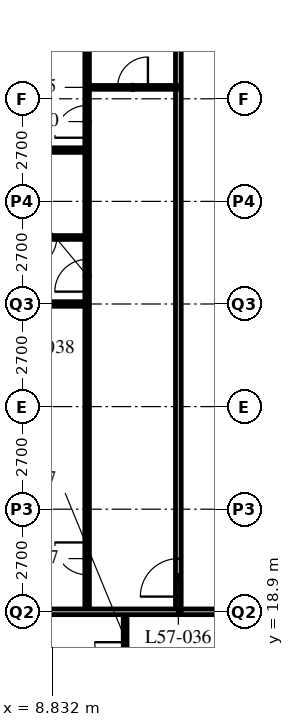
"""IFC4 building model, lengths in metres.
Left out: names, types, materials, properties, quantities, classifications, styles, units other than length and angle.
Written with IfcOpenShell. Run it as: python <this file> out.ifc"""

import sys

from ifc_helpers import new_model, si_unit, direction, frame, frame_2d, origin, place, context, subcontext, project, spatial, rectangle, extrude, element, fill, save


model = new_model("IFC4")
c1 = context("Model", 3, precision=1e-05, world=origin(), true_north=direction((0.0, 1.0)))
c2 = subcontext(c1, "Body", "Model", "MODEL_VIEW")
j1 = project(units=[si_unit("LENGTHUNIT", "METRE"), si_unit("PLANEANGLEUNIT", "RADIAN")], contexts=[c1])
p1 = place(None, origin())
s1 = spatial("IfcSite", under=j1, at=p1, CompositionType="ELEMENT")
p2 = place(p1, origin())
s2 = spatial("IfcBuilding", under=s1, at=p2, CompositionType="ELEMENT")
p3 = place(p2, frame((0.0, 0.0, 220.8)))
s3 = spatial("IfcBuildingStorey", under=s2, at=p3, CompositionType="ELEMENT", Elevation=220.8)
p4 = place(p3, frame((12.15, 18.9, 0.0), z_axis=(0.0, 0.0, 1.0), x_axis=(1.0, 0.0, 0.0)))
e1 = element("IfcWall", 1, at=p4, inside=s3, PredefinedType="PARTITIONING", context=c2, shape_type="SweptSolid", body=[
    extrude(rectangle(XDim=36.45, YDim=0.15, at=frame_2d((18.225, 0.0))), origin(), (0.0, 0.0, 1.0), 2.628),
])
p5 = place(p4, frame((4.95, 0.0, 0.0)))
e2 = element("IfcOpeningElement", 2, at=p5, cuts=e1, PredefinedType="OPENING", context=c2, shape_type="SweptSolid", body=[
    extrude(rectangle(XDim=1.0, YDim=2.1, at=frame_2d((0.5, 1.05))), frame((0.0, 0.085, 0.0), z_axis=(0.0, -1.0, 0.0), x_axis=(1.0, 0.0, 0.0)), (0.0, 0.0, 1.0), 0.17),
])
p6 = place(p4, frame((22.6, 0.0, 0.0)))
e3 = element("IfcOpeningElement", 3, at=p6, cuts=e1, PredefinedType="OPENING", context=c2, shape_type="SweptSolid", body=[
    extrude(rectangle(XDim=1.0, YDim=2.1, at=frame_2d((0.5, 1.05))), frame((0.0, 0.085, 0.0), z_axis=(0.0, -1.0, 0.0), x_axis=(1.0, 0.0, 0.0)), (0.0, 0.0, 1.0), 0.17),
])
p7 = place(p4, frame((25.0, 0.0, 0.0)))
e4 = element("IfcOpeningElement", 4, at=p7, cuts=e1, PredefinedType="OPENING", context=c2, shape_type="SweptSolid", body=[
    extrude(rectangle(XDim=1.0, YDim=2.1, at=frame_2d((0.5, 1.05))), frame((0.0, 0.085, 0.0), z_axis=(0.0, -1.0, 0.0), x_axis=(1.0, 0.0, 0.0)), (0.0, 0.0, 1.0), 0.17),
])
p8 = place(p4, frame((30.7, 0.0, 0.0)))
e5 = element("IfcOpeningElement", 5, at=p8, cuts=e1, PredefinedType="OPENING", context=c2, shape_type="SweptSolid", body=[
    extrude(rectangle(XDim=1.0, YDim=2.1, at=frame_2d((0.5, 1.05))), frame((0.0, 0.085, 0.0), z_axis=(0.0, -1.0, 0.0), x_axis=(1.0, 0.0, 0.0)), (0.0, 0.0, 1.0), 0.17),
])
p9 = place(p4, frame((1.525, 0.0, 0.0)))
e6 = element("IfcOpeningElement", 6, at=p9, cuts=e1, PredefinedType="OPENING", context=c2, shape_type="SweptSolid", body=[
    extrude(rectangle(XDim=1.0, YDim=2.1, at=frame_2d((0.5, 1.05))), frame((0.0, 0.085, 0.0), z_axis=(0.0, -1.0, 0.0), x_axis=(1.0, 0.0, 0.0)), (0.0, 0.0, 1.0), 0.17),
])
p10 = place(p4, frame((32.825, 0.0, 0.0)))
e7 = element("IfcOpeningElement", 7, at=p10, cuts=e1, PredefinedType="OPENING", context=c2, shape_type="SweptSolid", body=[
    extrude(rectangle(XDim=1.0, YDim=2.1, at=frame_2d((0.5, 1.05))), frame((0.0, 0.085, 0.0), z_axis=(0.0, -1.0, 0.0), x_axis=(1.0, 0.0, 0.0)), (0.0, 0.0, 1.0), 0.17),
])
p11 = place(p3, frame((12.15, 18.9, 0.0), z_axis=(0.0, 0.0, 1.0), x_axis=(0.0, 1.0, 0.0)))
e8 = element("IfcWall", 8, at=p11, inside=s3, PredefinedType="PARTITIONING", context=c2, shape_type="SweptSolid", body=[
    extrude(rectangle(XDim=24.3, YDim=0.15, at=frame_2d((12.15, 0.0))), origin(), (0.0, 0.0, 1.0), 3.39),
])
p12 = place(p11, frame((0.4, 0.0, 0.0)))
e9 = element("IfcOpeningElement", 9, at=p12, cuts=e8, PredefinedType="OPENING", context=c2, shape_type="SweptSolid", body=[
    extrude(rectangle(XDim=1.0, YDim=2.1, at=frame_2d((0.5, 1.05))), frame((0.0, 0.085, 0.0), z_axis=(0.0, -1.0, 0.0), x_axis=(1.0, 0.0, 0.0)), (0.0, 0.0, 1.0), 0.17),
])
p13 = place(p11, frame((16.6, 0.0, 0.0)))
e10 = element("IfcOpeningElement", 10, at=p13, cuts=e8, PredefinedType="OPENING", context=c2, shape_type="SweptSolid", body=[
    extrude(rectangle(XDim=1.0, YDim=2.1, at=frame_2d((0.5, 1.05))), frame((0.0, 0.085, 0.0), z_axis=(0.0, -1.0, 0.0), x_axis=(1.0, 0.0, 0.0)), (0.0, 0.0, 1.0), 0.17),
])
p14 = place(p3, frame((9.75, 18.9, 0.0), z_axis=(0.0, 0.0, 1.0), x_axis=(0.0, 1.0, 0.0)))
e11 = element("IfcWall", 11, at=p14, inside=s3, PredefinedType="PARTITIONING", context=c2, shape_type="SweptSolid", body=[
    extrude(rectangle(XDim=24.3, YDim=0.12, at=frame_2d((12.15, 0.0))), origin(), (0.0, 0.0, 1.0), 3.39),
])
p15 = place(p14, frame((0.975, 0.0, 0.0)))
e12 = element("IfcOpeningElement", 12, at=p15, cuts=e11, PredefinedType="OPENING", context=c2, shape_type="SweptSolid", body=[
    extrude(rectangle(XDim=0.85, YDim=2.1, at=frame_2d((0.425, 1.05))), frame((0.0, 0.07, 0.0), z_axis=(0.0, -1.0, 0.0), x_axis=(1.0, 0.0, 0.0)), (0.0, 0.0, 1.0), 0.14),
])
p16 = place(p14, frame((8.425, 0.0, 0.0)))
e13 = element("IfcOpeningElement", 13, at=p16, cuts=e11, PredefinedType="OPENING", context=c2, shape_type="SweptSolid", body=[
    extrude(rectangle(XDim=0.85, YDim=2.1, at=frame_2d((0.425, 1.05))), frame((0.0, 0.07, 0.0), z_axis=(0.0, -1.0, 0.0), x_axis=(1.0, 0.0, 0.0)), (0.0, 0.0, 1.0), 0.14),
])
p17 = place(p14, frame((12.475, 0.0, 0.0)))
e14 = element("IfcOpeningElement", 14, at=p17, cuts=e11, PredefinedType="OPENING", context=c2, shape_type="SweptSolid", body=[
    extrude(rectangle(XDim=0.85, YDim=2.1, at=frame_2d((0.425, 1.05))), frame((0.0, 0.07, 0.0), z_axis=(0.0, -1.0, 0.0), x_axis=(1.0, 0.0, 0.0)), (0.0, 0.0, 1.0), 0.14),
])
p18 = place(p14, frame((17.175, 0.0, 0.0)))
e15 = element("IfcOpeningElement", 15, at=p18, cuts=e11, PredefinedType="OPENING", context=c2, shape_type="SweptSolid", body=[
    extrude(rectangle(XDim=0.85, YDim=2.1, at=frame_2d((0.425, 1.05))), frame((0.0, 0.07, 0.0), z_axis=(0.0, -1.0, 0.0), x_axis=(1.0, 0.0, 0.0)), (0.0, 0.0, 1.0), 0.14),
])
p19 = place(p14, frame((20.575, 0.0, 0.0)))
e16 = element("IfcOpeningElement", 16, at=p19, cuts=e11, PredefinedType="OPENING", context=c2, shape_type="SweptSolid", body=[
    extrude(rectangle(XDim=0.85, YDim=2.1, at=frame_2d((0.425, 1.05))), frame((0.0, 0.07, 0.0), z_axis=(0.0, -1.0, 0.0), x_axis=(1.0, 0.0, 0.0)), (0.0, 0.0, 1.0), 0.14),
])
p20 = place(p3, frame((12.15, 32.7, 0.0), z_axis=(0.0, 0.0, 1.0), x_axis=(-1.0, 0.0, 0.0)))
e17 = element("IfcWall", 17, at=p20, inside=s3, PredefinedType="PARTITIONING", context=c2, shape_type="SweptSolid", body=[
    extrude(rectangle(XDim=2.4, YDim=0.1, at=frame_2d((1.2, 0.0))), origin(), (0.0, 0.0, 1.0), 3.39),
])
p21 = place(p20, frame((0.8, 0.0, 0.0)))
e18 = element("IfcOpeningElement", 18, at=p21, cuts=e17, PredefinedType="OPENING", context=c2, shape_type="SweptSolid", body=[
    extrude(rectangle(XDim=0.8, YDim=2.1, at=frame_2d((0.4, 1.05))), frame((0.0, 0.06, 0.0), z_axis=(0.0, -1.0, 0.0), x_axis=(1.0, 0.0, 0.0)), (0.0, 0.0, 1.0), 0.12),
])
p22 = place(p3, frame((9.75, 28.75, 0.0), z_axis=(0.0, 0.0, 1.0), x_axis=(-1.0, 0.0, 0.0)))
e19 = element("IfcWall", 19, at=p22, inside=s3, PredefinedType="PARTITIONING", context=c2, shape_type="SweptSolid", body=[
    extrude(rectangle(XDim=2.4, YDim=0.1, at=frame_2d((1.2, 0.0))), origin(), (0.0, 0.0, 1.0), 3.39),
])
p23 = place(p22, frame((0.8, 0.0, 0.0)))
e20 = element("IfcOpeningElement", 20, at=p23, cuts=e19, PredefinedType="OPENING", context=c2, shape_type="SweptSolid", body=[
    extrude(rectangle(XDim=0.8, YDim=2.1, at=frame_2d((0.4, 1.05))), frame((0.0, 0.06, 0.0), z_axis=(0.0, -1.0, 0.0), x_axis=(1.0, 0.0, 0.0)), (0.0, 0.0, 1.0), 0.12),
])
p24 = place(p3, frame((9.75, 27.0, 0.0), z_axis=(0.0, 0.0, 1.0), x_axis=(-1.0, 0.0, 0.0)))
e21 = element("IfcWall", 21, at=p24, inside=s3, PredefinedType="PARTITIONING", context=c2, shape_type="SweptSolid", body=[
    extrude(rectangle(XDim=9.45, YDim=0.12, at=frame_2d((4.725, 0.0))), origin(), (0.0, 0.0, 1.0), 2.628),
])
p25 = place(p3, frame((9.75, 31.05, 0.0), z_axis=(0.0, 0.0, 1.0), x_axis=(-1.0, 0.0, 0.0)))
e22 = element("IfcWall", 22, at=p25, inside=s3, PredefinedType="PARTITIONING", context=c2, shape_type="SweptSolid", body=[
    extrude(rectangle(XDim=9.45, YDim=0.12, at=frame_2d((4.725, 0.0))), origin(), (0.0, 0.0, 1.0), 3.39),
])
p26 = place(p3, frame((10.75, 18.9, 0.0), z_axis=(0.0, 0.0, 1.0), x_axis=(0.0, -1.0, 0.0)))
e23 = element("IfcWall", 23, at=p26, inside=s3, PredefinedType="PARTITIONING", context=c2, shape_type="SweptSolid", body=[
    extrude(rectangle(XDim=2.4, YDim=0.1, at=frame_2d((1.2, 0.0))), origin(), (0.0, 0.0, 1.0), 3.39),
])
p27 = place(p26, frame((0.8, 0.0, 0.0)))
e24 = element("IfcOpeningElement", 24, at=p27, cuts=e23, PredefinedType="OPENING", context=c2, shape_type="SweptSolid", body=[
    extrude(rectangle(XDim=0.8, YDim=2.1, at=frame_2d((0.4, 1.05))), frame((0.0, 0.06, 0.0), z_axis=(0.0, -1.0, 0.0), x_axis=(1.0, 0.0, 0.0)), (0.0, 0.0, 1.0), 0.12),
])
p28 = place(p3, frame((4.35, 18.9, 0.0), z_axis=(0.0, 0.0, 1.0), x_axis=(1.0, 0.0, 0.0)))
e25 = element("IfcWall", 25, at=p28, inside=s3, PredefinedType="PARTITIONING", context=c2, shape_type="SweptSolid", body=[
    extrude(rectangle(XDim=7.8, YDim=0.15, at=frame_2d((3.9, 0.0))), origin(), (0.0, 0.0, 1.0), 2.628),
])
p29 = place(p21, origin())
e26 = element("IfcDoor", 26, at=p29, inside=s3, OperationType="SINGLE_SWING_RIGHT", PredefinedType="DOOR", context=c2, shape_type="SweptSolid", body=[
    extrude(rectangle(XDim=0.8, YDim=2.1, at=frame_2d((0.4, 1.05))), frame((0.0, 0.025, 0.0), z_axis=(0.0, -1.0, 0.0), x_axis=(1.0, 0.0, 0.0)), (0.0, 0.0, 1.0), 0.05),
])
fill(e18, e26)
p30 = place(p12, origin())
e27 = element("IfcDoor", 27, at=p30, inside=s3, OperationType="SINGLE_SWING_LEFT", PredefinedType="DOOR", context=c2, shape_type="SweptSolid", body=[
    extrude(rectangle(XDim=1.0, YDim=2.1, at=frame_2d((0.5, 1.05))), frame((0.0, 0.025, 0.0), z_axis=(0.0, -1.0, 0.0), x_axis=(1.0, 0.0, 0.0)), (0.0, 0.0, 1.0), 0.05),
])
fill(e9, e27)
p31 = place(p15, origin())
e28 = element("IfcDoor", 28, at=p31, inside=s3, OperationType="SINGLE_SWING_RIGHT", PredefinedType="DOOR", context=c2, shape_type="SweptSolid", body=[
    extrude(rectangle(XDim=0.85, YDim=2.1, at=frame_2d((0.425, 1.05))), frame((0.0, 0.025, 0.0), z_axis=(0.0, -1.0, 0.0), x_axis=(1.0, 0.0, 0.0)), (0.0, 0.0, 1.0), 0.05),
])
fill(e12, e28)
p32 = place(p23, origin())
e29 = element("IfcDoor", 29, at=p32, inside=s3, OperationType="SINGLE_SWING_RIGHT", PredefinedType="DOOR", context=c2, shape_type="SweptSolid", body=[
    extrude(rectangle(XDim=0.8, YDim=2.1, at=frame_2d((0.4, 1.05))), frame((0.0, 0.025, 0.0), z_axis=(0.0, -1.0, 0.0), x_axis=(1.0, 0.0, 0.0)), (0.0, 0.0, 1.0), 0.05),
])
fill(e20, e29)
p33 = place(p16, origin())
e30 = element("IfcDoor", 30, at=p33, inside=s3, OperationType="SINGLE_SWING_LEFT", PredefinedType="DOOR", context=c2, shape_type="SweptSolid", body=[
    extrude(rectangle(XDim=0.85, YDim=2.1, at=frame_2d((0.425, 1.05))), frame((0.0, 0.025, 0.0), z_axis=(0.0, -1.0, 0.0), x_axis=(1.0, 0.0, 0.0)), (0.0, 0.0, 1.0), 0.05),
])
fill(e13, e30)
p34 = place(p17, origin())
e31 = element("IfcDoor", 31, at=p34, inside=s3, OperationType="SINGLE_SWING_LEFT", PredefinedType="DOOR", context=c2, shape_type="SweptSolid", body=[
    extrude(rectangle(XDim=0.85, YDim=2.1, at=frame_2d((0.425, 1.05))), frame((0.0, 0.025, 0.0), z_axis=(0.0, -1.0, 0.0), x_axis=(1.0, 0.0, 0.0)), (0.0, 0.0, 1.0), 0.05),
])
fill(e14, e31)
p35 = place(p27, origin())
e32 = element("IfcDoor", 32, at=p35, inside=s3, OperationType="SINGLE_SWING_RIGHT", PredefinedType="DOOR", context=c2, shape_type="SweptSolid", body=[
    extrude(rectangle(XDim=0.8, YDim=2.1, at=frame_2d((0.4, 1.05))), frame((0.0, 0.025, 0.0), z_axis=(0.0, -1.0, 0.0), x_axis=(1.0, 0.0, 0.0)), (0.0, 0.0, 1.0), 0.05),
])
fill(e24, e32)
save(model, sys.argv[1])
